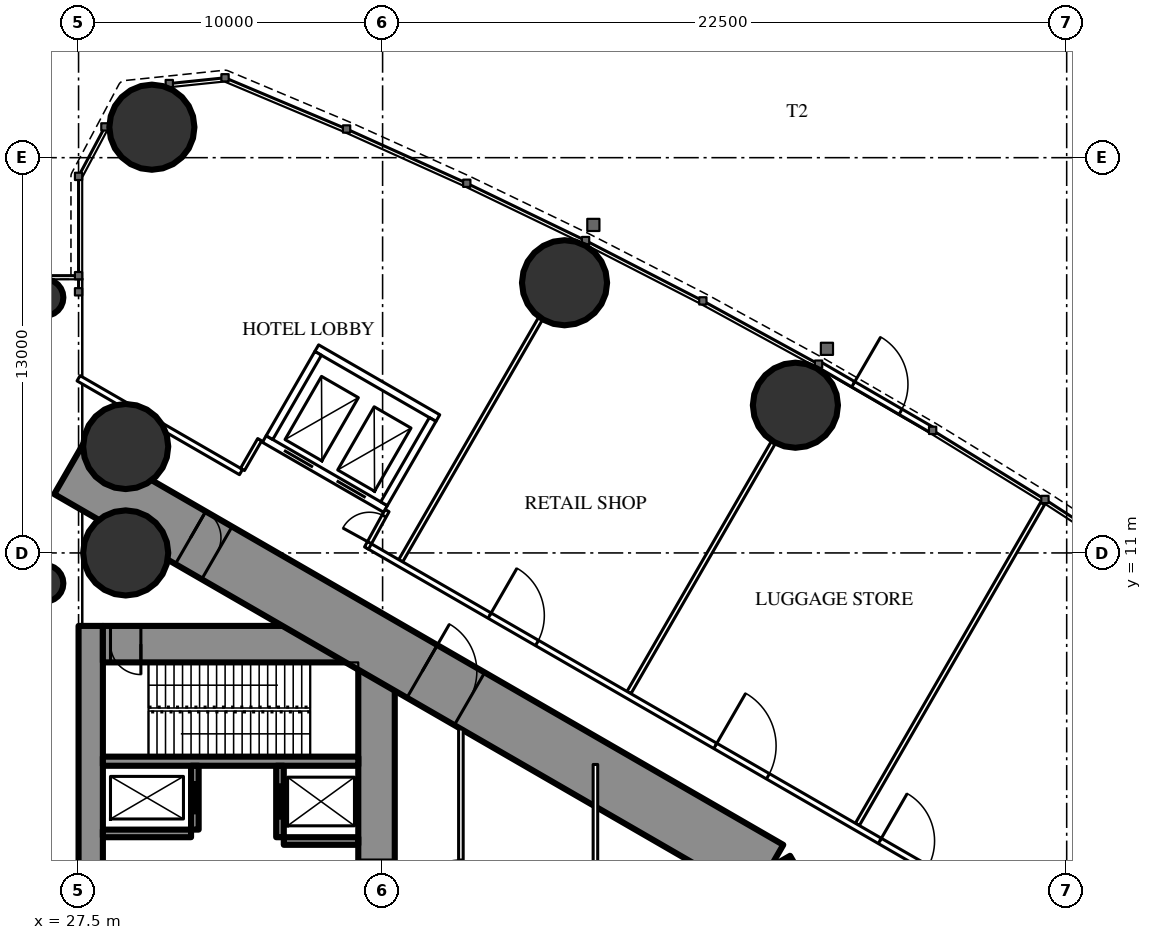
"""IFC4 building model, lengths in metres.
Left out: names, types, materials, properties, quantities, classifications, styles, units other than length and angle.
Written with IfcOpenShell. Run it as: python <this file> out.ifc"""

import sys

from ifc_helpers import new_model, si_unit, direction, frame, frame_2d, origin, origin_2d, place, context, subcontext, project, spatial, rectangle, circle, hollow_circle, extrude, element, fill, save


model = new_model("IFC4")
c1 = context("Model", 3, precision=1e-05, world=origin(), true_north=direction((0.0, 1.0)))
c2 = subcontext(c1, "Body", "Model", "MODEL_VIEW")
j1 = project(units=[si_unit("LENGTHUNIT", "METRE"), si_unit("PLANEANGLEUNIT", "RADIAN")], contexts=[c1])
p1 = place(None, origin())
s1 = spatial("IfcSite", under=j1, at=p1, CompositionType="ELEMENT")
p2 = place(p1, origin())
s2 = spatial("IfcBuilding", under=s1, at=p2, CompositionType="ELEMENT")
p3 = place(p2, origin())
s3 = spatial("IfcBuildingStorey", under=s2, at=p3, CompositionType="ELEMENT", Elevation=0.0)
for number, where, z_axis, x_axis in (
    (1, (29.911, 25.002, 0.0), (0.0, 0.0, 1.0), (1.0, 0.0, 0.0)),
    (2, (29.05, 11.0, 0.0), (0.0, 0.0, 1.0), (1.0, 0.0, 0.0)),
    (3, (29.05, 14.5, 0.0), (0.0, 0.0, 1.0), (1.0, 0.0, 0.0)),
    (4, (51.078, 15.858, 0.0), (0.0, 0.0, 1.0), (1.0, 0.0, 0.0)),
    (5, (43.484, 19.886, 0.0), (0.0, 0.0, 1.0), (1.0, 0.0, 0.0)),
):
    element("IfcColumn", number, at=place(p3, frame(where, z_axis=z_axis, x_axis=x_axis)), inside=s3, PredefinedType="COLUMN", context=c2, shape_type="SweptSolid", body=[
        extrude(hollow_circle(Radius=1.4, WallThickness=0.12, at=origin_2d()), origin(), (0.0, 0.0, 1.0), 7.2),
    ])
p4 = place(p3, frame((61.5, 0.0, 0.0), z_axis=(0.0, 0.0, 1.0), x_axis=(1.0, 0.0, 0.0)))
e6 = element("IfcColumn", 6, at=p4, inside=s3, PredefinedType="COLUMN", context=c2, shape_type="SweptSolid", body=[
    extrude(hollow_circle(Radius=1.4, WallThickness=0.1, at=origin_2d()), origin(), (0.0, 0.0, 1.0), 7.2),
])
p5 = place(p3, frame((27.9, -8.6, 0.0), z_axis=(0.0, 0.0, 1.0), x_axis=(0.0, 1.0, 0.0)))
e7 = element("IfcWall", 7, at=p5, inside=s3, PredefinedType="SHEAR", context=c2, shape_type="SweptSolid", body=[
    extrude(rectangle(XDim=17.2, YDim=0.8, at=frame_2d((8.6, 0.0))), origin(), (0.0, 0.0, 1.0), 7.2),
])
p6 = place(p3, frame((37.3, -8.6, 0.0), z_axis=(0.0, 0.0, 1.0), x_axis=(0.0, 1.0, 0.0)))
e8 = element("IfcWall", 8, at=p6, inside=s3, PredefinedType="SHEAR", context=c2, shape_type="SweptSolid", body=[
    extrude(rectangle(XDim=17.2, YDim=1.2, at=frame_2d((8.6, 0.0))), origin(), (0.0, 0.0, 1.0), 7.2),
])
p7 = place(p6, frame((7.7, 0.0, 0.0)))
e9 = element("IfcOpeningElement", 9, at=p7, cuts=e8, PredefinedType="OPENING", context=c2, shape_type="SweptSolid", body=[
    extrude(rectangle(XDim=1.8, YDim=2.2, at=frame_2d((0.9, 1.1))), frame((0.0, 0.61, 0.0), z_axis=(0.0, -1.0, 0.0), x_axis=(1.0, 0.0, 0.0)), (0.0, 0.0, 1.0), 1.22),
])
p8 = place(p3, frame((28.3, 8.0, 0.0), z_axis=(0.0, 0.0, 1.0), x_axis=(1.0, 0.0, 0.0)))
e10 = element("IfcWall", 10, at=p8, inside=s3, PredefinedType="SHEAR", context=c2, shape_type="SweptSolid", body=[
    extrude(rectangle(XDim=8.4, YDim=1.2, at=frame_2d((4.2, 0.0))), origin(), (0.0, 0.0, 1.0), 7.2),
])
p9 = place(p8, frame((0.25, 0.0, 0.0)))
e11 = element("IfcOpeningElement", 11, at=p9, cuts=e10, PredefinedType="OPENING", context=c2, shape_type="SweptSolid", body=[
    extrude(rectangle(XDim=1.0, YDim=2.2, at=frame_2d((0.5, 1.1))), frame((0.0, 0.61, 0.0), z_axis=(0.0, -1.0, 0.0), x_axis=(1.0, 0.0, 0.0)), (0.0, 0.0, 1.0), 1.22),
])
p10 = place(p3, frame((28.3, 4.15, 0.0), z_axis=(0.0, 0.0, 1.0), x_axis=(1.0, 0.0, 0.0)))
e12 = element("IfcWall", 12, at=p10, inside=s3, PredefinedType="SHEAR", context=c2, shape_type="SweptSolid", body=[
    extrude(rectangle(XDim=8.4, YDim=0.3, at=frame_2d((4.2, 0.0))), origin(), (0.0, 0.0, 1.0), 7.2),
])
p11 = place(p3, frame((31.325, 1.9, 0.0), z_axis=(0.0, 0.0, 1.0), x_axis=(0.0, 1.0, 0.0)))
e13 = element("IfcWall", 13, at=p11, inside=s3, PredefinedType="SHEAR", context=c2, shape_type="SweptSolid", body=[
    extrude(rectangle(XDim=2.1, YDim=0.25, at=frame_2d((1.05, 0.0))), origin(), (0.0, 0.0, 1.0), 7.2),
])
p12 = place(p11, frame((0.5, 0.0, 0.0)))
e14 = element("IfcOpeningElement", 14, at=p12, cuts=e13, PredefinedType="OPENING", context=c2, shape_type="SweptSolid", body=[
    extrude(rectangle(XDim=1.1, YDim=2.2, at=frame_2d((0.55, 1.1))), frame((0.0, 0.135, 0.0), z_axis=(0.0, -1.0, 0.0), x_axis=(1.0, 0.0, 0.0)), (0.0, 0.0, 1.0), 0.27),
])
p13 = place(p3, frame((34.125, 1.65, 0.0), z_axis=(0.0, 0.0, 1.0), x_axis=(0.0, 1.0, 0.0)))
e15 = element("IfcWall", 15, at=p13, inside=s3, PredefinedType="SHEAR", context=c2, shape_type="SweptSolid", body=[
    extrude(rectangle(XDim=2.35, YDim=0.25, at=frame_2d((1.175, 0.0))), origin(), (0.0, 0.0, 1.0), 7.2),
])
p14 = place(p13, frame((0.575, 0.0, 0.0)))
e16 = element("IfcOpeningElement", 16, at=p14, cuts=e15, PredefinedType="OPENING", context=c2, shape_type="SweptSolid", body=[
    extrude(rectangle(XDim=1.2, YDim=2.2, at=frame_2d((0.6, 1.1))), frame((0.0, 0.135, 0.0), z_axis=(0.0, -1.0, 0.0), x_axis=(1.0, 0.0, 0.0)), (0.0, 0.0, 1.0), 0.27),
])
p15 = place(p3, frame((28.3, 1.775, 0.0), z_axis=(0.0, 0.0, 1.0), x_axis=(1.0, 0.0, 0.0)))
e17 = element("IfcWall", 17, at=p15, inside=s3, PredefinedType="SHEAR", context=c2, shape_type="SweptSolid", body=[
    extrude(rectangle(XDim=2.9, YDim=0.25, at=frame_2d((1.45, 0.0))), origin(), (0.0, 0.0, 1.0), 7.2),
])
p16 = place(p3, frame((34.25, 1.525, 0.0), z_axis=(0.0, 0.0, 1.0), x_axis=(1.0, 0.0, 0.0)))
e18 = element("IfcWall", 18, at=p16, inside=s3, PredefinedType="SHEAR", context=c2, shape_type="SweptSolid", body=[
    extrude(rectangle(XDim=2.45, YDim=0.25, at=frame_2d((1.225, 0.0))), origin(), (0.0, 0.0, 1.0), 7.2),
])
p17 = place(p3, frame((27.2, -13.8, 0.0), z_axis=(0.0, 0.0, 1.0), x_axis=(0.866027159892, 0.499996958321, 0.0)))
e19 = element("IfcWall", 19, at=p17, inside=s3, PredefinedType="SHEAR", context=c2, shape_type="SweptSolid", body=[
    extrude(rectangle(XDim=27.947, YDim=2.0, at=frame_2d((13.973, 0.0))), origin(), (0.0, 0.0, 1.0), 7.2),
])
p18 = place(p17, frame((4.6, 0.0, 0.0)))
e20 = element("IfcOpeningElement", 20, at=p18, cuts=e19, PredefinedType="OPENING", context=c2, shape_type="SweptSolid", body=[
    extrude(rectangle(XDim=1.0, YDim=2.2, at=frame_2d((0.5, 1.1))), frame((0.0, 1.01, 0.0), z_axis=(0.0, -1.0, 0.0), x_axis=(1.0, 0.0, 0.0)), (0.0, 0.0, 1.0), 2.02),
])
p19 = place(p17, frame((13.395, 0.0, 0.0)))
e21 = element("IfcOpeningElement", 21, at=p19, cuts=e19, PredefinedType="OPENING", context=c2, shape_type="SweptSolid", body=[
    extrude(rectangle(XDim=1.8, YDim=2.2, at=frame_2d((0.9, 1.1))), frame((0.0, 1.01, 0.0), z_axis=(0.0, -1.0, 0.0), x_axis=(1.0, 0.0, 0.0)), (0.0, 0.0, 1.0), 2.02),
])
p20 = place(p3, frame((27.2, 13.8, 0.0), z_axis=(0.0, 0.0, 1.0), x_axis=(0.866024545924, -0.500001485854, 0.0)))
e22 = element("IfcWall", 22, at=p20, inside=s3, PredefinedType="SHEAR", context=c2, shape_type="SweptSolid", body=[
    extrude(rectangle(XDim=26.534, YDim=2.0, at=frame_2d((13.267, 0.0))), origin(), (0.0, 0.0, 1.0), 7.2),
])
p21 = place(p20, frame((4.6, 0.0, 0.0)))
e23 = element("IfcOpeningElement", 23, at=p21, cuts=e22, PredefinedType="OPENING", context=c2, shape_type="SweptSolid", body=[
    extrude(rectangle(XDim=1.0, YDim=2.2, at=frame_2d((0.5, 1.1))), frame((0.0, 1.01, 0.0), z_axis=(0.0, -1.0, 0.0), x_axis=(1.0, 0.0, 0.0)), (0.0, 0.0, 1.0), 2.02),
])
p22 = place(p20, frame((13.395, 0.0, 0.0)))
e24 = element("IfcOpeningElement", 24, at=p22, cuts=e22, PredefinedType="OPENING", context=c2, shape_type="SweptSolid", body=[
    extrude(rectangle(XDim=1.8, YDim=2.2, at=frame_2d((0.9, 1.1))), frame((0.0, 1.01, 0.0), z_axis=(0.0, -1.0, 0.0), x_axis=(1.0, 0.0, 0.0)), (0.0, 0.0, 1.0), 2.02),
])
for number, where, z_axis, x_axis in (
    (25, (26.4, 10.0, 0.0), (0.0, 0.0, 1.0), (1.0, 0.0, 0.0)),
    (26, (26.4, 19.4, 0.0), (0.0, 0.0, 1.0), (1.0, 0.0, 0.0)),
):
    element("IfcColumn", number, at=place(p3, frame(where, z_axis=z_axis, x_axis=x_axis)), inside=s3, PredefinedType="COLUMN", context=c2, shape_type="SweptSolid", body=[
        extrude(circle(Radius=0.6, at=origin_2d()), origin(), (0.0, 0.0, 1.0), 7.2),
    ])
p23 = place(p3, frame((51.839, 17.209, 0.0), z_axis=(0.0, 0.0, 1.0), x_axis=(0.864866989785, -0.502001085637, 0.0)))
e27 = element("IfcWall", 27, at=p23, inside=s3, PredefinedType="STANDARD", context=c2, shape_type="SweptSolid", body=[
    extrude(rectangle(XDim=4.338, YDim=0.2, at=frame_2d((2.169, 0.0))), origin(), (0.0, 0.0, 1.0), 6.85),
])
p24 = place(p23, frame((1.319, 0.0, 0.0)))
e28 = element("IfcOpeningElement", 28, at=p24, cuts=e27, PredefinedType="OPENING", context=c2, shape_type="SweptSolid", body=[
    extrude(rectangle(XDim=1.8, YDim=2.4, at=frame_2d((0.9, 1.2))), frame((0.0, 0.11, 0.0), z_axis=(0.0, -1.0, 0.0), x_axis=(1.0, 0.0, 0.0)), (0.0, 0.0, 1.0), 0.22),
])
p25 = place(p3, frame((38.095, 10.743, 0.0), z_axis=(0.0, 0.0, 1.0), x_axis=(0.499989105942, 0.866031693381, 0.0)))
e29 = element("IfcWall", 29, at=p25, inside=s3, PredefinedType="PARTITIONING", context=c2, shape_type="SweptSolid", body=[
    extrude(rectangle(XDim=9.194, YDim=0.15, at=frame_2d((4.597, 0.0))), origin(), (0.0, 0.0, 1.0), 5.85),
])
p26 = place(p3, frame((45.603, 6.408, 0.0), z_axis=(0.0, 0.0, 1.0), x_axis=(0.499999740363, 0.866025553686, 0.0)))
e30 = element("IfcWall", 30, at=p26, inside=s3, PredefinedType="PARTITIONING", context=c2, shape_type="SweptSolid", body=[
    extrude(rectangle(XDim=9.501, YDim=0.15, at=frame_2d((4.751, 0.0))), origin(), (0.0, 0.0, 1.0), 5.85),
])
p27 = place(p3, frame((53.115, 2.071, 0.0), z_axis=(0.0, 0.0, 1.0), x_axis=(0.500000975677, 0.866024840476, 0.0)))
e31 = element("IfcWall", 31, at=p27, inside=s3, PredefinedType="PARTITIONING", context=c2, shape_type="SweptSolid", body=[
    extrude(rectangle(XDim=12.191, YDim=0.15, at=frame_2d((6.095, 0.0))), origin(), (0.0, 0.0, 1.0), 6.85),
])
p28 = place(p3, frame((27.5, 16.744, 0.0), z_axis=(0.0, 0.0, 1.0), x_axis=(0.866035319247, -0.499982825521, 0.0)))
e32 = element("IfcWall", 32, at=p28, inside=s3, PredefinedType="PARTITIONING", context=c2, shape_type="SweptSolid", body=[
    extrude(rectangle(XDim=6.169, YDim=0.2, at=frame_2d((3.084, 0.0))), origin(), (0.0, 0.0, 1.0), 6.85),
])
p29 = place(p3, frame((37.034, 11.24, 0.0), z_axis=(0.0, 0.0, 1.0), x_axis=(0.866025942536, -0.499999066854, 0.0)))
e33 = element("IfcWall", 33, at=p29, inside=s3, PredefinedType="PARTITIONING", context=c2, shape_type="SweptSolid", body=[
    extrude(rectangle(XDim=22.36, YDim=0.2, at=frame_2d((11.18, 0.0))), origin(), (0.0, 0.0, 1.0), 6.85),
])
p30 = place(p29, frame((19.423, 0.0, 0.0)))
e34 = element("IfcOpeningElement", 34, at=p30, cuts=e33, PredefinedType="OPENING", context=c2, shape_type="SweptSolid", body=[
    extrude(rectangle(XDim=1.8, YDim=2.2, at=frame_2d((0.9, 1.1))), frame((0.0, 0.11, 0.0), z_axis=(0.0, -1.0, 0.0), x_axis=(1.0, 0.0, 0.0)), (0.0, 0.0, 1.0), 0.22),
])
p31 = place(p29, frame((13.174, 0.0, 0.0)))
e35 = element("IfcOpeningElement", 35, at=p31, cuts=e33, PredefinedType="OPENING", context=c2, shape_type="SweptSolid", body=[
    extrude(rectangle(XDim=2.0, YDim=2.4, at=frame_2d((1.0, 1.2))), frame((0.0, 0.11, 0.0), z_axis=(0.0, -1.0, 0.0), x_axis=(1.0, 0.0, 0.0)), (0.0, 0.0, 1.0), 0.22),
])
p32 = place(p29, frame((4.602, 0.0, 0.0)))
e36 = element("IfcOpeningElement", 36, at=p32, cuts=e33, PredefinedType="OPENING", context=c2, shape_type="SweptSolid", body=[
    extrude(rectangle(XDim=1.8, YDim=2.2, at=frame_2d((0.9, 1.1))), frame((0.0, 0.11, 0.0), z_axis=(0.0, -1.0, 0.0), x_axis=(1.0, 0.0, 0.0)), (0.0, 0.0, 1.0), 0.22),
])
p33 = place(p3, frame((36.971, 11.161, 0.0), z_axis=(0.0, 0.0, 1.0), x_axis=(0.481491794093, 0.876450598848, 0.0)))
e37 = element("IfcWall", 37, at=p33, inside=s3, PredefinedType="PARTITIONING", context=c2, shape_type="SweptSolid", body=[
    extrude(rectangle(XDim=1.405, YDim=0.15, at=frame_2d((0.703, 0.0))), origin(), (0.0, 0.0, 1.0), 6.85),
])
p34 = place(p33, frame((0.203, 0.0, 0.0)))
e38 = element("IfcOpeningElement", 38, at=p34, cuts=e37, PredefinedType="OPENING", context=c2, shape_type="SweptSolid", body=[
    extrude(rectangle(XDim=1.0, YDim=2.2, at=frame_2d((0.5, 1.1))), frame((0.0, 0.085, 0.0), z_axis=(0.0, -1.0, 0.0), x_axis=(1.0, 0.0, 0.0)), (0.0, 0.0, 1.0), 0.17),
])
p35 = place(p3, frame((32.892, 13.747, 0.0), z_axis=(0.0, 0.0, 1.0), x_axis=(0.499928262689, 0.866066817379, 0.0)))
e39 = element("IfcWall", 39, at=p35, inside=s3, PredefinedType="PARTITIONING", context=c2, shape_type="SweptSolid", body=[
    extrude(rectangle(XDim=1.13, YDim=0.15, at=frame_2d((0.565, 0.0))), origin(), (0.0, 0.0, 1.0), 6.85),
])
p36 = place(p3, frame((40.075, -5.212, 0.0), z_axis=(0.0, 0.0, 1.0), x_axis=(0.0, 1.0, 0.0)))
e40 = element("IfcWall", 40, at=p36, inside=s3, PredefinedType="PARTITIONING", context=c2, shape_type="SweptSolid", body=[
    extrude(rectangle(XDim=10.424, YDim=0.15, at=frame_2d((5.212, 0.0))), origin(), (0.0, 0.0, 1.0), 6.85),
])
p37 = place(p36, frame((4.312, 0.0, 0.0)))
e41 = element("IfcOpeningElement", 41, at=p37, cuts=e40, PredefinedType="OPENING", context=c2, shape_type="SweptSolid", body=[
    extrude(rectangle(XDim=1.8, YDim=2.2, at=frame_2d((0.9, 1.1))), frame((0.0, 0.085, 0.0), z_axis=(0.0, -1.0, 0.0), x_axis=(1.0, 0.0, 0.0)), (0.0, 0.0, 1.0), 0.17),
])
p38 = place(p3, frame((44.5, -4.043, 0.0), z_axis=(0.0, 0.0, 1.0), x_axis=(0.0, 1.0, 0.0)))
e42 = element("IfcWall", 42, at=p38, inside=s3, PredefinedType="PARTITIONING", context=c2, shape_type="SweptSolid", body=[
    extrude(rectangle(XDim=8.085, YDim=0.15, at=frame_2d((4.043, 0.0))), origin(), (0.0, 0.0, 1.0), 5.45),
])
p39 = place(p38, frame((3.543, 0.0, 0.0)))
e43 = element("IfcOpeningElement", 43, at=p39, cuts=e42, PredefinedType="OPENING", context=c2, shape_type="SweptSolid", body=[
    extrude(rectangle(XDim=1.0, YDim=2.2, at=frame_2d((0.5, 1.1))), frame((0.0, 0.085, 0.0), z_axis=(0.0, -1.0, 0.0), x_axis=(1.0, 0.0, 0.0)), (0.0, 0.0, 1.0), 0.17),
])
p40 = place(p3, frame((33.608, 14.747, 0.0), z_axis=(0.0, 0.0, 1.0), x_axis=(0.866043305498, -0.49996899204, 0.0)))
e44 = element("IfcWall", 44, at=p40, inside=s3, PredefinedType="PARTITIONING", context=c2, shape_type="SweptSolid", body=[
    extrude(rectangle(XDim=4.6, YDim=0.25, at=frame_2d((2.3, 0.0))), origin(), (0.0, 0.0, 1.0), 6.85),
])
p41 = place(p40, frame((0.75, 0.0, 0.0)))
e45 = element("IfcOpeningElement", 45, at=p41, cuts=e44, PredefinedType="OPENING", context=c2, shape_type="SweptSolid", body=[
    extrude(rectangle(XDim=1.1, YDim=2.2, at=frame_2d((0.55, 1.1))), frame((0.0, 0.135, 0.0), z_axis=(0.0, -1.0, 0.0), x_axis=(1.0, 0.0, 0.0)), (0.0, 0.0, 1.0), 0.27),
])
p42 = place(p40, frame((2.75, 0.0, 0.0)))
e46 = element("IfcOpeningElement", 46, at=p42, cuts=e44, PredefinedType="OPENING", context=c2, shape_type="SweptSolid", body=[
    extrude(rectangle(XDim=1.1, YDim=2.2, at=frame_2d((0.55, 1.1))), frame((0.0, 0.135, 0.0), z_axis=(0.0, -1.0, 0.0), x_axis=(1.0, 0.0, 0.0)), (0.0, 0.0, 1.0), 0.27),
])
p43 = place(p3, frame((35.333, 17.736, 0.0), z_axis=(0.0, 0.0, 1.0), x_axis=(0.866043305498, -0.49996899204, 0.0)))
e47 = element("IfcWall", 47, at=p43, inside=s3, PredefinedType="PARTITIONING", context=c2, shape_type="SweptSolid", body=[
    extrude(rectangle(XDim=4.6, YDim=0.25, at=frame_2d((2.3, 0.0))), origin(), (0.0, 0.0, 1.0), 6.85),
])
for number, where, z_axis, x_axis in (
    (48, (33.779, 14.793, 0.0), (0.0, 0.0, 1.0), (0.5, 0.866, 0.0)),
    (49, (37.547, 12.618, 0.0), (0.0, 0.0, 1.0), (0.5, 0.866, 0.0)),
):
    element("IfcWall", number, at=place(p3, frame(where, z_axis=z_axis, x_axis=x_axis)), inside=s3, PredefinedType="PARTITIONING", context=c2, shape_type="SweptSolid", body=[
        extrude(rectangle(XDim=3.201, YDim=0.25, at=frame_2d((1.6, 0.0))), origin(), (0.0, 0.0, 1.0), 6.85),
    ])
p44 = place(p24, origin())
e50 = element("IfcDoor", 50, at=p44, inside=s3, OperationType="SINGLE_SWING_LEFT", PredefinedType="DOOR", context=c2, shape_type="SweptSolid", body=[
    extrude(rectangle(XDim=1.8, YDim=2.4, at=frame_2d((0.9, 1.2))), frame((0.0, 0.025, 0.0), z_axis=(0.0, -1.0, 0.0), x_axis=(1.0, 0.0, 0.0)), (0.0, 0.0, 1.0), 0.05),
])
fill(e28, e50)
p45 = place(p30, origin())
e51 = element("IfcDoor", 51, at=p45, inside=s3, OperationType="DOUBLE_DOOR_SINGLE_SWING", PredefinedType="DOOR", context=c2, shape_type="SweptSolid", body=[
    extrude(rectangle(XDim=1.8, YDim=2.2, at=frame_2d((0.9, 1.1))), frame((0.0, 0.025, 0.0), z_axis=(0.0, -1.0, 0.0), x_axis=(1.0, 0.0, 0.0)), (0.0, 0.0, 1.0), 0.05),
])
fill(e34, e51)
p46 = place(p31, origin())
e52 = element("IfcDoor", 52, at=p46, inside=s3, OperationType="DOUBLE_DOOR_SINGLE_SWING", PredefinedType="DOOR", context=c2, shape_type="SweptSolid", body=[
    extrude(rectangle(XDim=2.0, YDim=2.4, at=frame_2d((1.0, 1.2))), frame((0.0, 0.025, 0.0), z_axis=(0.0, -1.0, 0.0), x_axis=(1.0, 0.0, 0.0)), (0.0, 0.0, 1.0), 0.05),
])
fill(e35, e52)
p47 = place(p32, origin())
e53 = element("IfcDoor", 53, at=p47, inside=s3, OperationType="DOUBLE_DOOR_SINGLE_SWING", PredefinedType="DOOR", context=c2, shape_type="SweptSolid", body=[
    extrude(rectangle(XDim=1.8, YDim=2.2, at=frame_2d((0.9, 1.1))), frame((0.0, 0.025, 0.0), z_axis=(0.0, -1.0, 0.0), x_axis=(1.0, 0.0, 0.0)), (0.0, 0.0, 1.0), 0.05),
])
fill(e36, e53)
p48 = place(p34, origin())
e54 = element("IfcDoor", 54, at=p48, inside=s3, OperationType="SINGLE_SWING_LEFT", PredefinedType="DOOR", context=c2, shape_type="SweptSolid", body=[
    extrude(rectangle(XDim=1.0, YDim=2.2, at=frame_2d((0.5, 1.1))), frame((0.0, 0.025, 0.0), z_axis=(0.0, -1.0, 0.0), x_axis=(1.0, 0.0, 0.0)), (0.0, 0.0, 1.0), 0.05),
])
fill(e38, e54)
p49 = place(p37, origin())
e55 = element("IfcDoor", 55, at=p49, inside=s3, OperationType="DOUBLE_DOOR_SINGLE_SWING", PredefinedType="DOOR", context=c2, shape_type="SweptSolid", body=[
    extrude(rectangle(XDim=1.8, YDim=2.2, at=frame_2d((0.9, 1.1))), frame((0.0, 0.025, 0.0), z_axis=(0.0, -1.0, 0.0), x_axis=(1.0, 0.0, 0.0)), (0.0, 0.0, 1.0), 0.05),
])
fill(e41, e55)
p50 = place(p21, origin())
e56 = element("IfcDoor", 56, at=p50, inside=s3, OperationType="SINGLE_SWING_LEFT", PredefinedType="DOOR", context=c2, shape_type="SweptSolid", body=[
    extrude(rectangle(XDim=1.0, YDim=2.2, at=frame_2d((0.5, 1.1))), frame((0.0, 0.025, 0.0), z_axis=(0.0, -1.0, 0.0), x_axis=(1.0, 0.0, 0.0)), (0.0, 0.0, 1.0), 0.05),
])
fill(e23, e56)
p51 = place(p22, origin())
e57 = element("IfcDoor", 57, at=p51, inside=s3, OperationType="DOUBLE_DOOR_SINGLE_SWING", PredefinedType="DOOR", context=c2, shape_type="SweptSolid", body=[
    extrude(rectangle(XDim=1.8, YDim=2.2, at=frame_2d((0.9, 1.1))), frame((0.0, 0.025, 0.0), z_axis=(0.0, -1.0, 0.0), x_axis=(1.0, 0.0, 0.0)), (0.0, 0.0, 1.0), 0.05),
])
fill(e24, e57)
p52 = place(p7, origin())
e58 = element("IfcDoor", 58, at=p52, inside=s3, OperationType="DOUBLE_DOOR_SINGLE_SWING", PredefinedType="DOOR", context=c2, shape_type="SweptSolid", body=[
    extrude(rectangle(XDim=1.8, YDim=2.2, at=frame_2d((0.9, 1.1))), frame((0.0, 0.025, 0.0), z_axis=(0.0, -1.0, 0.0), x_axis=(1.0, 0.0, 0.0)), (0.0, 0.0, 1.0), 0.05),
])
fill(e9, e58)
p53 = place(p9, origin())
e59 = element("IfcDoor", 59, at=p53, inside=s3, OperationType="SINGLE_SWING_RIGHT", PredefinedType="DOOR", context=c2, shape_type="SweptSolid", body=[
    extrude(rectangle(XDim=1.0, YDim=2.2, at=frame_2d((0.5, 1.1))), frame((0.0, 0.025, 0.0), z_axis=(0.0, -1.0, 0.0), x_axis=(1.0, 0.0, 0.0)), (0.0, 0.0, 1.0), 0.05),
])
fill(e11, e59)
p54 = place(p12, origin())
e60 = element("IfcDoor", 60, at=p54, inside=s3, OperationType="SLIDING_TO_LEFT", PredefinedType="USERDEFINED", context=c2, shape_type="SweptSolid", body=[
    extrude(rectangle(XDim=1.1, YDim=2.2, at=frame_2d((0.55, 1.1))), frame((0.0, 0.025, 0.0), z_axis=(0.0, -1.0, 0.0), x_axis=(1.0, 0.0, 0.0)), (0.0, 0.0, 1.0), 0.05),
])
fill(e14, e60)
p55 = place(p14, origin())
e61 = element("IfcDoor", 61, at=p55, inside=s3, OperationType="DOUBLE_DOOR_SLIDING", PredefinedType="USERDEFINED", context=c2, shape_type="SweptSolid", body=[
    extrude(rectangle(XDim=1.2, YDim=2.2, at=frame_2d((0.6, 1.1))), frame((0.0, 0.025, 0.0), z_axis=(0.0, -1.0, 0.0), x_axis=(1.0, 0.0, 0.0)), (0.0, 0.0, 1.0), 0.05),
])
fill(e16, e61)
p56 = place(p41, origin())
e62 = element("IfcDoor", 62, at=p56, inside=s3, OperationType="DOUBLE_DOOR_SLIDING", PredefinedType="USERDEFINED", context=c2, shape_type="SweptSolid", body=[
    extrude(rectangle(XDim=1.1, YDim=2.2, at=frame_2d((0.55, 1.1))), frame((0.0, 0.025, 0.0), z_axis=(0.0, -1.0, 0.0), x_axis=(1.0, 0.0, 0.0)), (0.0, 0.0, 1.0), 0.05),
])
fill(e45, e62)
p57 = place(p42, origin())
e63 = element("IfcDoor", 63, at=p57, inside=s3, OperationType="DOUBLE_DOOR_SLIDING", PredefinedType="USERDEFINED", context=c2, shape_type="SweptSolid", body=[
    extrude(rectangle(XDim=1.1, YDim=2.2, at=frame_2d((0.55, 1.1))), frame((0.0, 0.025, 0.0), z_axis=(0.0, -1.0, 0.0), x_axis=(1.0, 0.0, 0.0)), (0.0, 0.0, 1.0), 0.05),
])
fill(e46, e63)
save(model, sys.argv[1])
